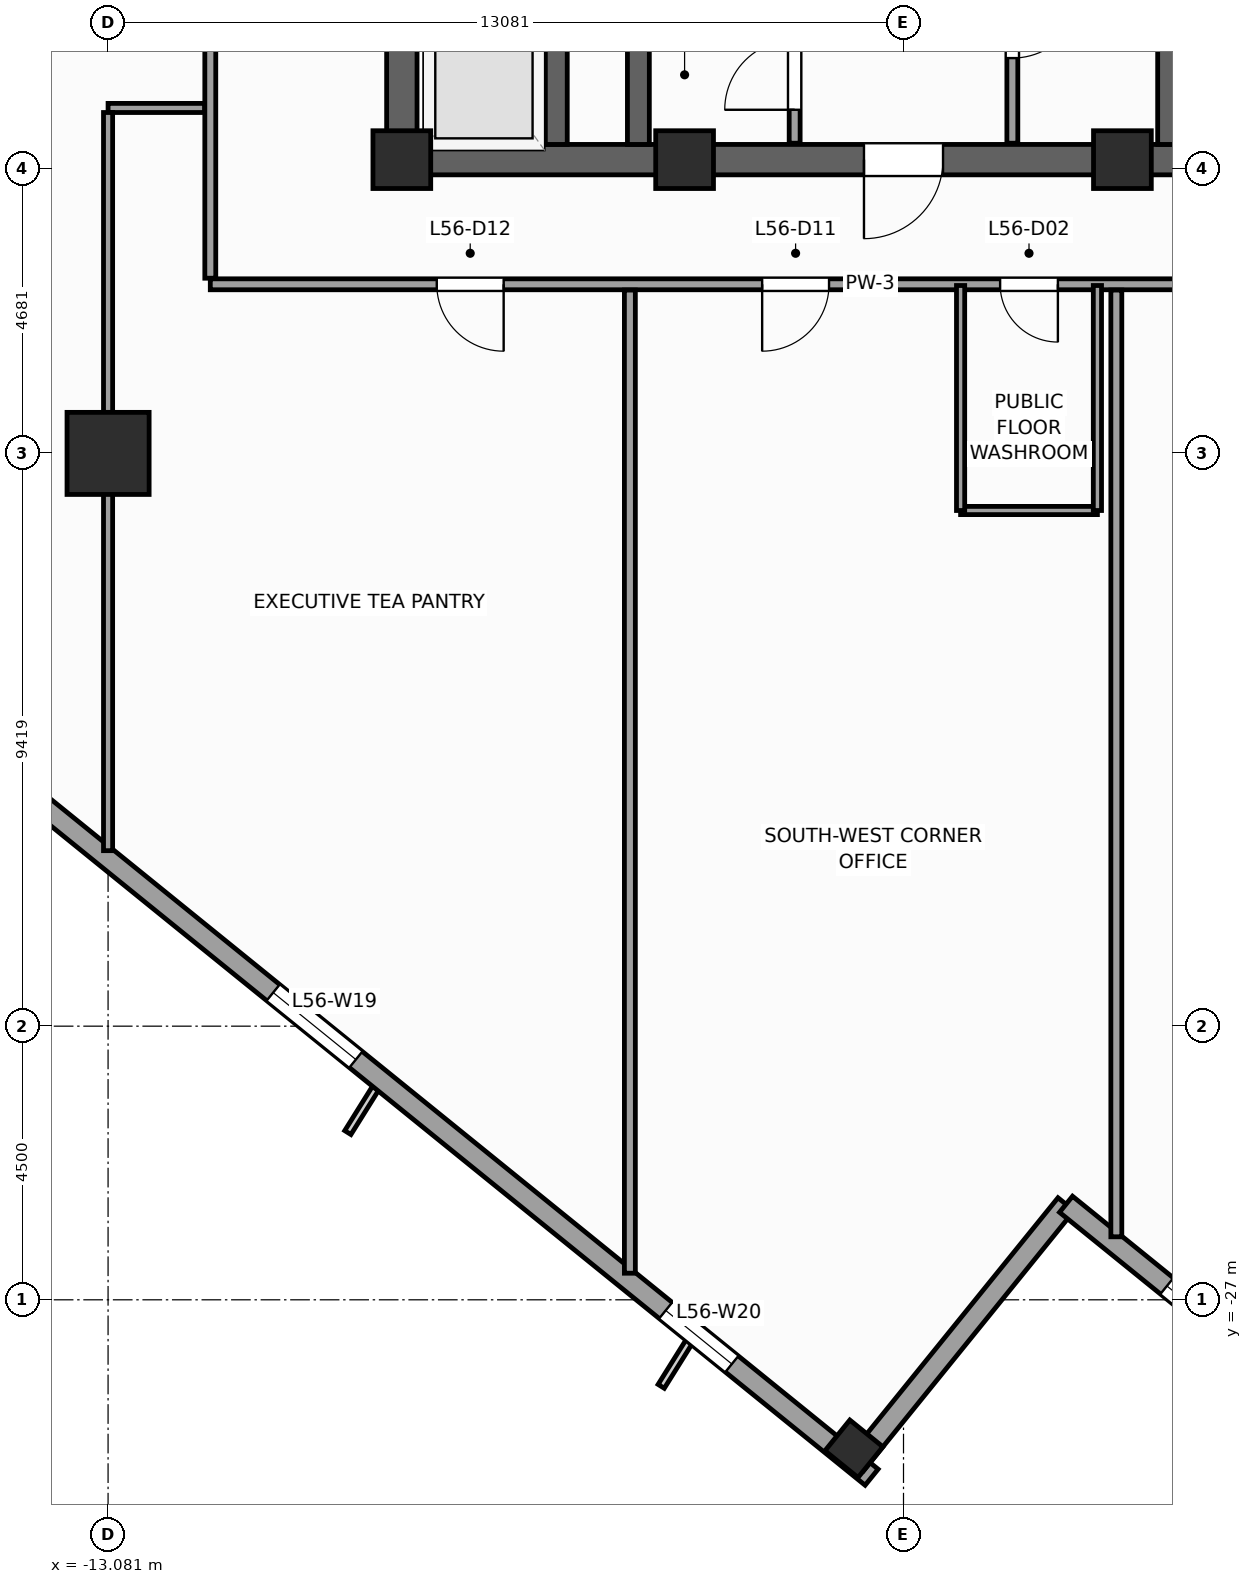
"""IFC4 building model, lengths in metres.
Left out: names, types, materials, properties, quantities, classifications, styles, units other than length and angle.
Written with IfcOpenShell. Run it as: python <this file> out.ifc"""

import sys

from ifc_helpers import new_model, si_unit, direction, frame, frame_2d, origin, origin_2d, place, context, subcontext, project, spatial, rectangle, extrude, source, transform, mapped, element, fill, save


model = new_model("IFC4")
c1 = context("Model", 3, precision=1e-05, world=origin(), true_north=direction((0.0, 1.0)))
c2 = subcontext(c1, "Body", "Model", "MODEL_VIEW")
j1 = project(units=[si_unit("LENGTHUNIT", "METRE"), si_unit("PLANEANGLEUNIT", "RADIAN")], contexts=[c1])
p1 = place(None, origin())
s1 = spatial("IfcSite", under=j1, at=p1, CompositionType="ELEMENT")
p2 = place(p1, origin())
s2 = spatial("IfcBuilding", under=s1, at=p2, CompositionType="ELEMENT")
p3 = place(p2, frame((0.0, 0.0, 232.9)))
s3 = spatial("IfcBuildingStorey", under=s2, at=p3, CompositionType="ELEMENT", Elevation=232.9)
p4 = place(p3, frame((-8.5, -8.25, 0.0), z_axis=(0.0, 0.0, 1.0), x_axis=(1.0, 0.0, 0.0)))
e1 = element("IfcWall", 1, at=p4, inside=s3, PredefinedType="SHEAR", context=c2, shape_type="SweptSolid", body=[
    extrude(rectangle(XDim=17.0, YDim=0.5, at=frame_2d((8.5, 0.0))), origin(), (0.0, 0.0, 1.0), 3.9),
])
p5 = place(p4, frame((7.85, 0.0, 0.0)))
e2 = element("IfcOpeningElement", 2, at=p5, cuts=e1, PredefinedType="OPENING", context=c2, shape_type="SweptSolid", body=[
    extrude(rectangle(XDim=1.3, YDim=2.2, at=frame_2d((0.65, 1.1))), frame((0.0, 0.26, 0.0), z_axis=(0.0, -1.0, 0.0), x_axis=(1.0, 0.0, 0.0)), (0.0, 0.0, 1.0), 0.52),
])
p6 = place(p3, frame((-8.25, -8.0, 0.0), z_axis=(0.0, 0.0, 1.0), x_axis=(0.0, 1.0, 0.0)))
e3 = element("IfcWall", 3, at=p6, inside=s3, PredefinedType="SHEAR", context=c2, shape_type="SweptSolid", body=[
    extrude(rectangle(XDim=16.0, YDim=0.5, at=frame_2d((8.0, 0.0))), origin(), (0.0, 0.0, 1.0), 3.9),
])
p7 = place(p6, frame((4.69, 0.0, 0.0)))
e4 = element("IfcOpeningElement", 4, at=p7, cuts=e3, PredefinedType="OPENING", context=c2, shape_type="SweptSolid", body=[
    extrude(rectangle(XDim=1.3, YDim=2.2, at=frame_2d((0.65, 1.1))), frame((0.0, 0.26, 0.0), z_axis=(0.0, -1.0, 0.0), x_axis=(1.0, 0.0, 0.0)), (0.0, 0.0, 1.0), 0.52),
])
for number, where, z_axis, x_axis in (
    (5, (-4.36, -8.0, 0.0), (0.0, 0.0, 1.0), (0.0, 1.0, 0.0)),
    (6, (4.36, -8.0, 0.0), (0.0, 0.0, 1.0), (0.0, 1.0, 0.0)),
):
    element("IfcWall", number, at=place(p3, frame(where, z_axis=z_axis, x_axis=x_axis)), inside=s3, PredefinedType="SHEAR", context=c2, shape_type="SweptSolid", body=[
        extrude(rectangle(XDim=16.0, YDim=0.36, at=frame_2d((8.0, 0.0))), origin(), (0.0, 0.0, 1.0), 3.9),
    ])
p8 = place(p3, frame((-5.71, -8.0, 0.0), z_axis=(0.0, 0.0, 1.0), x_axis=(0.0, 1.0, 0.0)))
e7 = element("IfcWall", 7, at=p8, inside=s3, PredefinedType="SHEAR", context=c2, shape_type="SweptSolid", body=[
    extrude(rectangle(XDim=2.54, YDim=0.36, at=frame_2d((1.27, 0.0))), origin(), (0.0, 0.0, 1.0), 3.9),
])
m1 = source(origin(), c2, "Body", "SweptSolid", [
    extrude(rectangle(XDim=0.95, YDim=0.95, at=origin_2d()), origin(), (0.0, 0.0, 1.0), 3.9),
])
for number, where, z_axis, x_axis in (
    (8, (-8.25, -8.25, 0.0), (0.0, 0.0, 1.0), (1.0, 0.0, 0.0)),
    (9, (-3.6, -8.25, 0.0), (0.0, 0.0, 1.0), (1.0, 0.0, 0.0)),
    (10, (3.6, -8.25, 0.0), (0.0, 0.0, 1.0), (1.0, 0.0, 0.0)),
):
    element("IfcColumn", number, at=place(p3, frame(where, z_axis=z_axis, x_axis=x_axis)), inside=s3, PredefinedType="PILASTER", context=c2, shape_type="MappedRepresentation", body=[
        mapped(m1, transform((0.0, 0.0, 0.0), scale=1.0)),
    ])
m2 = source(origin(), c2, "Body", "SweptSolid", [
    extrude(rectangle(XDim=1.35, YDim=1.35, at=origin_2d()), origin(), (0.0, 0.0, 1.0), 3.9),
])
p9 = place(p3, frame((-13.081, -13.081, 0.0), z_axis=(0.0, 0.0, 1.0), x_axis=(1.0, 0.0, 0.0)))
e11 = element("IfcColumn", 11, at=p9, inside=s3, PredefinedType="COLUMN", context=c2, shape_type="MappedRepresentation", body=[
    mapped(m2, transform((0.0, 0.0, 0.0), scale=1.0)),
])
m3 = source(origin(), c2, "Body", "SweptSolid", [
    extrude(rectangle(XDim=0.65, YDim=0.7, at=origin_2d()), origin(), (0.0, 0.0, 1.0), 3.9),
])
p10 = place(p3, frame((-0.815, -29.45, 0.0), z_axis=(0.0, 0.0, 1.0), x_axis=(0.62932039105, 0.777145961457, 0.0)))
e12 = element("IfcColumn", 12, at=p10, inside=s3, PredefinedType="COLUMN", context=c2, shape_type="MappedRepresentation", body=[
    mapped(m3, transform((0.0, 0.0, 0.0), scale=1.0)),
])
p11 = place(p3, frame((-29.154, -6.733, 0.0), z_axis=(0.0, 0.0, 1.0), x_axis=(0.77714192302, -0.629325378072, 0.0)))
e13 = element("IfcWall", 13, at=p11, inside=s3, PredefinedType="STANDARD", context=c2, shape_type="SweptSolid", body=[
    extrude(rectangle(XDim=36.84, YDim=0.34, at=frame_2d((18.42, 0.0))), origin(), (0.0, 0.0, 1.0), 2.96),
])
p12 = place(p11, frame((3.721, 0.0, 0.48)))
e14 = element("IfcOpeningElement", 14, at=p12, cuts=e13, PredefinedType="OPENING", context=c2, shape_type="SweptSolid", body=[
    extrude(rectangle(XDim=1.4, YDim=2.4, at=frame_2d((0.7, 1.2))), frame((0.0, 0.18, 0.0), z_axis=(0.0, -1.0, 0.0), x_axis=(1.0, 0.0, 0.0)), (0.0, 0.0, 1.0), 0.36),
])
p13 = place(p11, frame((9.809, 0.0, 0.58)))
e15 = element("IfcOpeningElement", 15, at=p13, cuts=e13, PredefinedType="OPENING", context=c2, shape_type="SweptSolid", body=[
    extrude(rectangle(XDim=1.75, YDim=2.3, at=frame_2d((0.875, 1.15))), frame((0.0, 0.18, 0.0), z_axis=(0.0, -1.0, 0.0), x_axis=(1.0, 0.0, 0.0)), (0.0, 0.0, 1.0), 0.36),
])
p14 = place(p11, frame((16.058, 0.0, 0.58)))
e16 = element("IfcOpeningElement", 16, at=p14, cuts=e13, PredefinedType="OPENING", context=c2, shape_type="SweptSolid", body=[
    extrude(rectangle(XDim=1.75, YDim=2.3, at=frame_2d((0.875, 1.15))), frame((0.0, 0.18, 0.0), z_axis=(0.0, -1.0, 0.0), x_axis=(1.0, 0.0, 0.0)), (0.0, 0.0, 1.0), 0.36),
])
p15 = place(p11, frame((24.176, 0.0, 0.58)))
e17 = element("IfcOpeningElement", 17, at=p15, cuts=e13, PredefinedType="OPENING", context=c2, shape_type="SweptSolid", body=[
    extrude(rectangle(XDim=1.75, YDim=2.3, at=frame_2d((0.875, 1.15))), frame((0.0, 0.18, 0.0), z_axis=(0.0, -1.0, 0.0), x_axis=(1.0, 0.0, 0.0)), (0.0, 0.0, 1.0), 0.36),
])
p16 = place(p11, frame((32.482, 0.0, 0.48)))
e18 = element("IfcOpeningElement", 18, at=p16, cuts=e13, PredefinedType="OPENING", context=c2, shape_type="SweptSolid", body=[
    extrude(rectangle(XDim=1.4, YDim=2.4, at=frame_2d((0.7, 1.2))), frame((0.0, 0.18, 0.0), z_axis=(0.0, -1.0, 0.0), x_axis=(1.0, 0.0, 0.0)), (0.0, 0.0, 1.0), 0.36),
])
p17 = place(p3, frame((-0.789, -29.703, 0.0), z_axis=(0.0, 0.0, 1.0), x_axis=(0.629323365087, 0.77714355312, 0.0)))
e19 = element("IfcWall", 19, at=p17, inside=s3, PredefinedType="STANDARD", context=c2, shape_type="SweptSolid", body=[
    extrude(rectangle(XDim=5.5, YDim=0.34, at=frame_2d((2.75, 0.0))), origin(), (0.0, 0.0, 1.0), 3.66),
])
p18 = place(p3, frame((2.673, -25.429, 0.0), z_axis=(0.0, 0.0, 1.0), x_axis=(0.777162640055, -0.629299794138, 0.0)))
e20 = element("IfcWall", 20, at=p18, inside=s3, PredefinedType="STANDARD", context=c2, shape_type="SweptSolid", body=[
    extrude(rectangle(XDim=5.67, YDim=0.34, at=frame_2d((2.835, 0.0))), origin(), (0.0, 0.0, 1.0), 3.66),
])
p19 = place(p18, frame((2.135, 0.0, 0.48)))
e21 = element("IfcOpeningElement", 21, at=p19, cuts=e20, PredefinedType="OPENING", context=c2, shape_type="SweptSolid", body=[
    extrude(rectangle(XDim=1.4, YDim=2.4, at=frame_2d((0.7, 1.2))), frame((0.0, 0.18, 0.0), z_axis=(0.0, -1.0, 0.0), x_axis=(1.0, 0.0, 0.0)), (0.0, 0.0, 1.0), 0.36),
])
p20 = place(p3, frame((-1.79, -7.98, 0.0), z_axis=(0.0, 0.0, 1.0), x_axis=(0.0, 1.0, 0.0)))
e22 = element("IfcWall", 22, at=p20, inside=s3, PredefinedType="PARTITIONING", context=c2, shape_type="SweptSolid", body=[
    extrude(rectangle(XDim=12.38, YDim=0.18, at=frame_2d((6.19, 0.0))), origin(), (0.0, 0.0, 1.0), 3.66),
])
p21 = place(p20, frame((8.8, 0.0, 0.0)))
e23 = element("IfcOpeningElement", 23, at=p21, cuts=e22, PredefinedType="OPENING", context=c2, shape_type="SweptSolid", body=[
    extrude(rectangle(XDim=1.1, YDim=2.2, at=frame_2d((0.55, 1.1))), frame((0.0, 0.1, 0.0), z_axis=(0.0, -1.0, 0.0), x_axis=(1.0, 0.0, 0.0)), (0.0, 0.0, 1.0), 0.2),
])
p22 = place(p20, frame((10.86, 0.0, 0.0)))
e24 = element("IfcOpeningElement", 24, at=p22, cuts=e22, PredefinedType="OPENING", context=c2, shape_type="SweptSolid", body=[
    extrude(rectangle(XDim=1.1, YDim=2.2, at=frame_2d((0.55, 1.1))), frame((0.0, 0.1, 0.0), z_axis=(0.0, -1.0, 0.0), x_axis=(1.0, 0.0, 0.0)), (0.0, 0.0, 1.0), 0.2),
])
p23 = place(p20, frame((0.55, 0.0, 0.0)))
e25 = element("IfcOpeningElement", 25, at=p23, cuts=e22, PredefinedType="OPENING", context=c2, shape_type="SweptSolid", body=[
    extrude(rectangle(XDim=1.15, YDim=2.25, at=frame_2d((0.575, 1.125))), frame((0.0, 0.1, 0.0), z_axis=(0.0, -1.0, 0.0), x_axis=(1.0, 0.0, 0.0)), (0.0, 0.0, 1.0), 0.2),
])
p24 = place(p20, frame((2.72, 0.0, 0.0)))
e26 = element("IfcOpeningElement", 26, at=p24, cuts=e22, PredefinedType="OPENING", context=c2, shape_type="SweptSolid", body=[
    extrude(rectangle(XDim=0.88, YDim=2.1, at=frame_2d((0.44, 1.05))), frame((0.0, 0.1, 0.0), z_axis=(0.0, -1.0, 0.0), x_axis=(1.0, 0.0, 0.0)), (0.0, 0.0, 1.0), 0.2),
])
p25 = place(p3, frame((1.79, -7.98, 0.0), z_axis=(0.0, 0.0, 1.0), x_axis=(0.0, 1.0, 0.0)))
e27 = element("IfcWall", 27, at=p25, inside=s3, PredefinedType="PARTITIONING", context=c2, shape_type="SweptSolid", body=[
    extrude(rectangle(XDim=12.38, YDim=0.18, at=frame_2d((6.19, 0.0))), origin(), (0.0, 0.0, 1.0), 3.66),
])
p26 = place(p25, frame((8.8, 0.0, 0.0)))
e28 = element("IfcOpeningElement", 28, at=p26, cuts=e27, PredefinedType="OPENING", context=c2, shape_type="SweptSolid", body=[
    extrude(rectangle(XDim=1.1, YDim=2.2, at=frame_2d((0.55, 1.1))), frame((0.0, 0.1, 0.0), z_axis=(0.0, -1.0, 0.0), x_axis=(1.0, 0.0, 0.0)), (0.0, 0.0, 1.0), 0.2),
])
p27 = place(p25, frame((10.86, 0.0, 0.0)))
e29 = element("IfcOpeningElement", 29, at=p27, cuts=e27, PredefinedType="OPENING", context=c2, shape_type="SweptSolid", body=[
    extrude(rectangle(XDim=1.1, YDim=2.2, at=frame_2d((0.55, 1.1))), frame((0.0, 0.1, 0.0), z_axis=(0.0, -1.0, 0.0), x_axis=(1.0, 0.0, 0.0)), (0.0, 0.0, 1.0), 0.2),
])
p28 = place(p25, frame((1.4, 0.0, 0.0)))
e30 = element("IfcOpeningElement", 30, at=p28, cuts=e27, PredefinedType="OPENING", context=c2, shape_type="SweptSolid", body=[
    extrude(rectangle(XDim=1.15, YDim=2.25, at=frame_2d((0.575, 1.125))), frame((0.0, 0.1, 0.0), z_axis=(0.0, -1.0, 0.0), x_axis=(1.0, 0.0, 0.0)), (0.0, 0.0, 1.0), 0.2),
])
p29 = place(p3, frame((-11.4, -10.3, 0.0), z_axis=(0.0, 0.0, 1.0), x_axis=(1.0, 0.0, 0.0)))
e31 = element("IfcWall", 31, at=p29, inside=s3, PredefinedType="PARTITIONING", context=c2, shape_type="SweptSolid", body=[
    extrude(rectangle(XDim=21.7, YDim=0.18, at=frame_2d((10.85, 0.0))), origin(), (0.0, 0.0, 1.0), 3.66),
])
p30 = place(p29, frame((12.989, 0.0, 0.0)))
e32 = element("IfcOpeningElement", 32, at=p30, cuts=e31, PredefinedType="OPENING", context=c2, shape_type="SweptSolid", body=[
    extrude(rectangle(XDim=0.95, YDim=2.1, at=frame_2d((0.475, 1.05))), frame((0.0, 0.1, 0.0), z_axis=(0.0, -1.0, 0.0), x_axis=(1.0, 0.0, 0.0)), (0.0, 0.0, 1.0), 0.2),
])
p31 = place(p29, frame((17.585, 0.0, 0.0)))
e33 = element("IfcOpeningElement", 33, at=p31, cuts=e31, PredefinedType="OPENING", context=c2, shape_type="SweptSolid", body=[
    extrude(rectangle(XDim=1.1, YDim=2.2, at=frame_2d((0.55, 1.1))), frame((0.0, 0.1, 0.0), z_axis=(0.0, -1.0, 0.0), x_axis=(1.0, 0.0, 0.0)), (0.0, 0.0, 1.0), 0.2),
])
p32 = place(p29, frame((9.075, 0.0, 0.0)))
e34 = element("IfcOpeningElement", 34, at=p32, cuts=e31, PredefinedType="OPENING", context=c2, shape_type="SweptSolid", body=[
    extrude(rectangle(XDim=1.1, YDim=2.2, at=frame_2d((0.55, 1.1))), frame((0.0, 0.1, 0.0), z_axis=(0.0, -1.0, 0.0), x_axis=(1.0, 0.0, 0.0)), (0.0, 0.0, 1.0), 0.2),
])
p33 = place(p29, frame((3.724, 0.0, 0.0)))
e35 = element("IfcOpeningElement", 35, at=p33, cuts=e31, PredefinedType="OPENING", context=c2, shape_type="SweptSolid", body=[
    extrude(rectangle(XDim=1.1, YDim=2.2, at=frame_2d((0.55, 1.1))), frame((0.0, 0.1, 0.0), z_axis=(0.0, -1.0, 0.0), x_axis=(1.0, 0.0, 0.0)), (0.0, 0.0, 1.0), 0.2),
])
p34 = place(p3, frame((-11.4, -10.2, 0.0), z_axis=(0.0, 0.0, 1.0), x_axis=(0.0, 1.0, 0.0)))
e36 = element("IfcWall", 36, at=p34, inside=s3, PredefinedType="PARTITIONING", context=c2, shape_type="SweptSolid", body=[
    extrude(rectangle(XDim=20.4, YDim=0.18, at=frame_2d((10.2, 0.0))), origin(), (0.0, 0.0, 1.0), 3.66),
])
p35 = place(p34, frame((14.85, 0.0, 0.0)))
e37 = element("IfcOpeningElement", 37, at=p35, cuts=e36, PredefinedType="OPENING", context=c2, shape_type="SweptSolid", body=[
    extrude(rectangle(XDim=1.1, YDim=2.2, at=frame_2d((0.55, 1.1))), frame((0.0, 0.1, 0.0), z_axis=(0.0, -1.0, 0.0), x_axis=(1.0, 0.0, 0.0)), (0.0, 0.0, 1.0), 0.2),
])
p36 = place(p34, frame((4.7, 0.0, 0.0)))
e38 = element("IfcOpeningElement", 38, at=p36, cuts=e36, PredefinedType="OPENING", context=c2, shape_type="SweptSolid", body=[
    extrude(rectangle(XDim=1.1, YDim=2.2, at=frame_2d((0.55, 1.1))), frame((0.0, 0.1, 0.0), z_axis=(0.0, -1.0, 0.0), x_axis=(1.0, 0.0, 0.0)), (0.0, 0.0, 1.0), 0.2),
])
p37 = place(p34, frame((9.9, 0.0, 0.0)))
e39 = element("IfcOpeningElement", 39, at=p37, cuts=e36, PredefinedType="OPENING", context=c2, shape_type="SweptSolid", body=[
    extrude(rectangle(XDim=1.1, YDim=2.2, at=frame_2d((0.55, 1.1))), frame((0.0, 0.1, 0.0), z_axis=(0.0, -1.0, 0.0), x_axis=(1.0, 0.0, 0.0)), (0.0, 0.0, 1.0), 0.2),
])
p38 = place(p3, frame((3.5, -10.395, 0.0), z_axis=(0.0, 0.0, 1.0), x_axis=(0.0, -1.0, 0.0)))
e40 = element("IfcWall", 40, at=p38, inside=s3, PredefinedType="PARTITIONING", context=c2, shape_type="SweptSolid", body=[
    extrude(rectangle(XDim=15.569, YDim=0.18, at=frame_2d((7.784, 0.0))), origin(), (0.0, 0.0, 1.0), 3.66),
])
p39 = place(p3, frame((-4.5, -10.395, 0.0), z_axis=(0.0, 0.0, 1.0), x_axis=(0.0, -1.0, 0.0)))
e41 = element("IfcWall", 41, at=p39, inside=s3, PredefinedType="PARTITIONING", context=c2, shape_type="SweptSolid", body=[
    extrude(rectangle(XDim=16.168, YDim=0.18, at=frame_2d((8.084, 0.0))), origin(), (0.0, 0.0, 1.0), 3.66),
])
p40 = place(p3, frame((-11.495, -7.4, 0.0), z_axis=(0.0, 0.0, 1.0), x_axis=(-1.0, 0.0, 0.0)))
e42 = element("IfcWall", 42, at=p40, inside=s3, PredefinedType="PARTITIONING", context=c2, shape_type="SweptSolid", body=[
    extrude(rectangle(XDim=1.586, YDim=0.15, at=frame_2d((0.793, 0.0))), origin(), (0.0, 0.0, 1.0), 3.66),
])
p41 = place(p3, frame((-13.081, -7.475, 0.0), z_axis=(0.0, 0.0, 1.0), x_axis=(0.0, -1.0, 0.0)))
e43 = element("IfcWall", 43, at=p41, inside=s3, PredefinedType="PARTITIONING", context=c2, shape_type="SweptSolid", body=[
    extrude(rectangle(XDim=12.139, YDim=0.15, at=frame_2d((6.069, 0.0))), origin(), (0.0, 0.0, 1.0), 2.76),
])
p42 = place(p3, frame((0.939, -14.02, 0.0), z_axis=(0.0, 0.0, 1.0), x_axis=(1.0, 0.0, 0.0)))
e44 = element("IfcWall", 44, at=p42, inside=s3, PredefinedType="PARTITIONING", context=c2, shape_type="SweptSolid", body=[
    extrude(rectangle(XDim=2.25, YDim=0.135, at=frame_2d((1.125, 0.0))), origin(), (0.0, 0.0, 1.0), 3.66),
])
for number, where, z_axis, x_axis in (
    (45, (3.189, -14.02, 0.0), (0.0, 0.0, 1.0), (0.0, 1.0, 0.0)),
    (46, (0.939, -14.02, 0.0), (0.0, 0.0, 1.0), (0.0, 1.0, 0.0)),
):
    element("IfcWall", number, at=place(p3, frame(where, z_axis=z_axis, x_axis=x_axis)), inside=s3, PredefinedType="PARTITIONING", context=c2, shape_type="SweptSolid", body=[
        extrude(rectangle(XDim=3.7, YDim=0.135, at=frame_2d((1.85, 0.0))), origin(), (0.0, 0.0, 1.0), 3.66),
    ])
m4 = source(origin(), c2, "Body", "SweptSolid", [
    extrude(rectangle(XDim=1.75, YDim=2.3, at=frame_2d((0.875, 1.15))), frame((0.0, 0.03, 0.0), z_axis=(0.0, -1.0, 0.0), x_axis=(1.0, 0.0, 0.0)), (0.0, 0.0, 1.0), 0.06),
])
p43 = place(p15, origin())
e47 = element("IfcWindow", 47, at=p43, inside=s3, PartitioningType="SINGLE_PANEL", PredefinedType="WINDOW", context=c2, shape_type="MappedRepresentation", body=[
    mapped(m4, transform((0.0, 0.0, 0.0), scale=1.0)),
])
fill(e17, e47)
m5 = source(origin(), c2, "Body", "SweptSolid", [
    extrude(rectangle(XDim=1.4, YDim=2.4, at=frame_2d((0.7, 1.2))), frame((0.0, 0.03, 0.0), z_axis=(0.0, -1.0, 0.0), x_axis=(1.0, 0.0, 0.0)), (0.0, 0.0, 1.0), 0.06),
])
p44 = place(p16, origin())
e48 = element("IfcWindow", 48, at=p44, inside=s3, PartitioningType="SINGLE_PANEL", PredefinedType="WINDOW", context=c2, shape_type="MappedRepresentation", body=[
    mapped(m5, transform((0.0, 0.0, 0.0), scale=1.0)),
])
fill(e18, e48)
p45 = place(p19, origin())
e49 = element("IfcWindow", 49, at=p45, inside=s3, PartitioningType="SINGLE_PANEL", PredefinedType="WINDOW", context=c2, shape_type="MappedRepresentation", body=[
    mapped(m5, transform((0.0, 0.0, 0.0), scale=1.0)),
])
fill(e21, e49)
m6 = source(origin(), c2, "Body", "SweptSolid", [
    extrude(rectangle(XDim=1.3, YDim=2.2, at=frame_2d((0.65, 1.1))), frame((0.0, 0.025, 0.0), z_axis=(0.0, -1.0, 0.0), x_axis=(1.0, 0.0, 0.0)), (0.0, 0.0, 1.0), 0.05),
])
p46 = place(p5, frame((1.3, 0.0, 0.0), z_axis=(0.0, 0.0, 1.0), x_axis=(-1.0, 0.0, 0.0)))
e50 = element("IfcDoor", 50, at=p46, inside=s3, OperationType="SINGLE_SWING_LEFT", PredefinedType="DOOR", context=c2, shape_type="MappedRepresentation", body=[
    mapped(m6, transform((0.0, 0.0, 0.0), scale=1.0)),
])
fill(e2, e50)
m7 = source(origin(), c2, "Body", "SweptSolid", [
    extrude(rectangle(XDim=1.15, YDim=2.25, at=frame_2d((0.575, 1.125))), frame((0.0, 0.025, 0.0), z_axis=(0.0, -1.0, 0.0), x_axis=(1.0, 0.0, 0.0)), (0.0, 0.0, 1.0), 0.05),
])
p47 = place(p23, origin())
e51 = element("IfcDoor", 51, at=p47, inside=s3, OperationType="SINGLE_SWING_LEFT", PredefinedType="DOOR", context=c2, shape_type="MappedRepresentation", body=[
    mapped(m7, transform((0.0, 0.0, 0.0), scale=1.0)),
])
fill(e25, e51)
p48 = place(p28, frame((1.15, 0.0, 0.0), z_axis=(0.0, 0.0, 1.0), x_axis=(-1.0, 0.0, 0.0)))
e52 = element("IfcDoor", 52, at=p48, inside=s3, OperationType="SINGLE_SWING_RIGHT", PredefinedType="DOOR", context=c2, shape_type="MappedRepresentation", body=[
    mapped(m7, transform((0.0, 0.0, 0.0), scale=1.0)),
])
fill(e30, e52)
m8 = source(origin(), c2, "Body", "SweptSolid", [
    extrude(rectangle(XDim=0.95, YDim=2.1, at=frame_2d((0.475, 1.05))), frame((0.0, 0.025, 0.0), z_axis=(0.0, -1.0, 0.0), x_axis=(1.0, 0.0, 0.0)), (0.0, 0.0, 1.0), 0.05),
])
p49 = place(p30, frame((0.95, 0.0, 0.0), z_axis=(0.0, 0.0, 1.0), x_axis=(-1.0, 0.0, 0.0)))
e53 = element("IfcDoor", 53, at=p49, inside=s3, OperationType="SINGLE_SWING_RIGHT", PredefinedType="DOOR", context=c2, shape_type="MappedRepresentation", body=[
    mapped(m8, transform((0.0, 0.0, 0.0), scale=1.0)),
])
fill(e32, e53)
m9 = source(origin(), c2, "Body", "SweptSolid", [
    extrude(rectangle(XDim=1.1, YDim=2.2, at=frame_2d((0.55, 1.1))), frame((0.0, 0.025, 0.0), z_axis=(0.0, -1.0, 0.0), x_axis=(1.0, 0.0, 0.0)), (0.0, 0.0, 1.0), 0.05),
])
p50 = place(p32, frame((1.1, 0.0, 0.0), z_axis=(0.0, 0.0, 1.0), x_axis=(-1.0, 0.0, 0.0)))
e54 = element("IfcDoor", 54, at=p50, inside=s3, OperationType="SINGLE_SWING_LEFT", PredefinedType="DOOR", context=c2, shape_type="MappedRepresentation", body=[
    mapped(m9, transform((0.0, 0.0, 0.0), scale=1.0)),
])
fill(e34, e54)
p51 = place(p33, frame((1.1, 0.0, 0.0), z_axis=(0.0, 0.0, 1.0), x_axis=(-1.0, 0.0, 0.0)))
e55 = element("IfcDoor", 55, at=p51, inside=s3, OperationType="SINGLE_SWING_RIGHT", PredefinedType="DOOR", context=c2, shape_type="MappedRepresentation", body=[
    mapped(m9, transform((0.0, 0.0, 0.0), scale=1.0)),
])
fill(e35, e55)
save(model, sys.argv[1])
